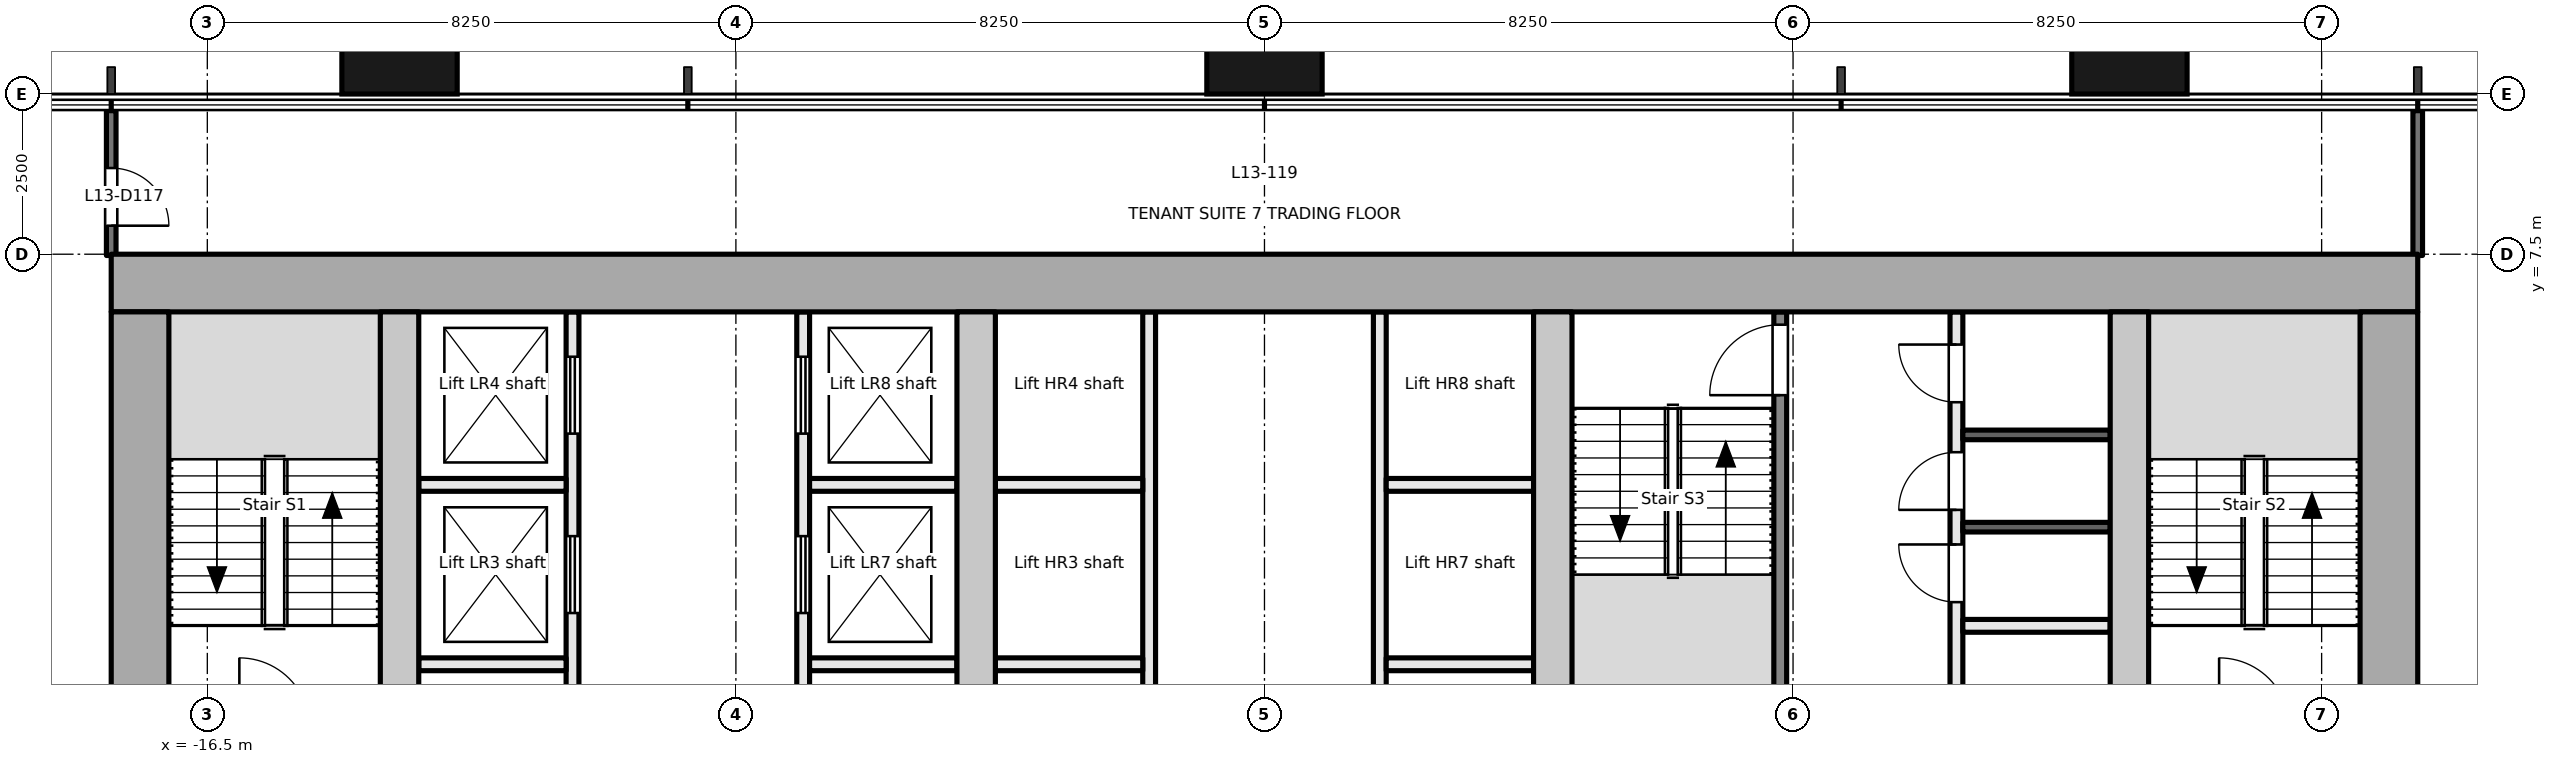
"""IFC4 building model, lengths in metres.
Left out: names, types, materials, properties, quantities, classifications, styles, units other than length and angle.
Written with IfcOpenShell. Run it as: python <this file> out.ifc"""

import sys

from ifc_helpers import new_model, si_unit, direction, frame, frame_2d, origin, origin_2d, place, context, subcontext, project, spatial, rectangle, extrude, element, fill, save


model = new_model("IFC4")
c1 = context("Model", 3, precision=1e-05, world=origin(), true_north=direction((0.0, 1.0)))
c2 = subcontext(c1, "Body", "Model", "MODEL_VIEW")
j1 = project(units=[si_unit("LENGTHUNIT", "METRE"), si_unit("PLANEANGLEUNIT", "RADIAN")], contexts=[c1])
p1 = place(None, origin())
s1 = spatial("IfcSite", under=j1, at=p1, CompositionType="ELEMENT")
p2 = place(p1, origin())
s2 = spatial("IfcBuilding", under=s1, at=p2, CompositionType="ELEMENT")
p3 = place(p2, frame((0.0, 0.0, 61.1)))
s3 = spatial("IfcBuildingStorey", under=s2, at=p3, CompositionType="ELEMENT", Elevation=61.1)
for number, where, z_axis, x_axis in (
    (1, (-13.5, 10.9, -0.2), (0.0, 0.0, 1.0), (1.0, 0.0, 0.0)),
    (2, (0.0, 10.9, -0.2), (0.0, 0.0, 1.0), (1.0, 0.0, 0.0)),
    (3, (13.5, 10.9, -0.2), (0.0, 0.0, 1.0), (1.0, 0.0, 0.0)),
):
    element("IfcColumn", number, at=place(p3, frame(where, z_axis=z_axis, x_axis=x_axis)), inside=s3, PredefinedType="COLUMN", context=c2, shape_type="SweptSolid", body=[
        extrude(rectangle(XDim=1.8, YDim=1.8, at=origin_2d()), origin(), (0.0, 0.0, 1.0), 4.1),
    ])
p4 = place(p3, frame((-18.0, 7.05, -0.2), z_axis=(0.0, 0.0, 1.0), x_axis=(1.0, 0.0, 0.0)))
e4 = element("IfcWall", 4, at=p4, inside=s3, PredefinedType="SHEAR", context=c2, shape_type="SweptSolid", body=[
    extrude(rectangle(XDim=36.0, YDim=0.9, at=frame_2d((18.0, 0.0))), origin(), (0.0, 0.0, 1.0), 4.1),
])
p5 = place(p3, frame((-17.55, -6.6, -0.2), z_axis=(0.0, 0.0, 1.0), x_axis=(0.0, 1.0, 0.0)))
e5 = element("IfcWall", 5, at=p5, inside=s3, PredefinedType="SHEAR", context=c2, shape_type="SweptSolid", body=[
    extrude(rectangle(XDim=13.2, YDim=0.9, at=frame_2d((6.6, 0.0))), origin(), (0.0, 0.0, 1.0), 4.1),
])
p6 = place(p5, frame((4.55, 0.0, 0.2)))
e6 = element("IfcOpeningElement", 6, at=p6, cuts=e5, PredefinedType="OPENING", context=c2, shape_type="SweptSolid", body=[
    extrude(rectangle(XDim=1.2, YDim=2.1, at=frame_2d((0.6, 1.05))), frame((0.0, 0.46, 0.0), z_axis=(0.0, -1.0, 0.0), x_axis=(1.0, 0.0, 0.0)), (0.0, 0.0, 1.0), 0.921),
])
p7 = place(p3, frame((17.55, -6.6, -0.2), z_axis=(0.0, 0.0, 1.0), x_axis=(0.0, 1.0, 0.0)))
e7 = element("IfcWall", 7, at=p7, inside=s3, PredefinedType="SHEAR", context=c2, shape_type="SweptSolid", body=[
    extrude(rectangle(XDim=13.2, YDim=0.9, at=frame_2d((6.6, 0.0))), origin(), (0.0, 0.0, 1.0), 4.1),
])
p8 = place(p7, frame((4.55, 0.0, 0.2)))
e8 = element("IfcOpeningElement", 8, at=p8, cuts=e7, PredefinedType="OPENING", context=c2, shape_type="SweptSolid", body=[
    extrude(rectangle(XDim=1.2, YDim=2.1, at=frame_2d((0.6, 1.05))), frame((0.0, 0.46, 0.0), z_axis=(0.0, -1.0, 0.0), x_axis=(1.0, 0.0, 0.0)), (0.0, 0.0, 1.0), 0.921),
])
for number, where, z_axis, x_axis in (
    (9, (-13.5, -6.6, -0.2), (0.0, 0.0, 1.0), (0.0, 1.0, 0.0)),
    (10, (-4.5, -6.6, -0.2), (0.0, 0.0, 1.0), (0.0, 1.0, 0.0)),
    (11, (4.5, -6.6, -0.2), (0.0, 0.0, 1.0), (0.0, 1.0, 0.0)),
    (12, (13.5, -6.6, -0.2), (0.0, 0.0, 1.0), (0.0, 1.0, 0.0)),
):
    element("IfcWall", number, at=place(p3, frame(where, z_axis=z_axis, x_axis=x_axis)), inside=s3, PredefinedType="SHEAR", context=c2, shape_type="SweptSolid", body=[
        extrude(rectangle(XDim=13.2, YDim=0.6, at=frame_2d((6.6, 0.0))), origin(), (0.0, 0.0, 1.0), 4.1),
    ])
p9 = place(p3, frame((-10.8, -6.6, 0.0), z_axis=(0.0, 0.0, 1.0), x_axis=(0.0, 1.0, 0.0)))
e13 = element("IfcWall", 13, at=p9, inside=s3, PredefinedType="PARTITIONING", context=c2, shape_type="SweptSolid", body=[
    extrude(rectangle(XDim=13.2, YDim=0.2, at=frame_2d((6.6, 0.0))), origin(), (0.0, 0.0, 1.0), 3.9),
])
p10 = place(p9, frame((0.55, 0.0, 0.0)))
e14 = element("IfcOpeningElement", 14, at=p10, cuts=e13, PredefinedType="OPENING", context=c2, shape_type="SweptSolid", body=[
    extrude(rectangle(XDim=0.9, YDim=2.1, at=frame_2d((0.45, 1.05))), frame((0.0, 0.111, 0.0), z_axis=(0.0, -1.0, 0.0), x_axis=(1.0, 0.0, 0.0)), (0.0, 0.0, 1.0), 0.221),
])
p11 = place(p9, frame((2.9, 0.0, 0.0)))
e15 = element("IfcOpeningElement", 15, at=p11, cuts=e13, PredefinedType="OPENING", context=c2, shape_type="SweptSolid", body=[
    extrude(rectangle(XDim=1.2, YDim=2.1, at=frame_2d((0.6, 1.05))), frame((0.0, 0.111, 0.0), z_axis=(0.0, -1.0, 0.0), x_axis=(1.0, 0.0, 0.0)), (0.0, 0.0, 1.0), 0.221),
])
p12 = place(p9, frame((5.7, 0.0, 0.0)))
e16 = element("IfcOpeningElement", 16, at=p12, cuts=e13, PredefinedType="OPENING", context=c2, shape_type="SweptSolid", body=[
    extrude(rectangle(XDim=1.2, YDim=2.1, at=frame_2d((0.6, 1.05))), frame((0.0, 0.111, 0.0), z_axis=(0.0, -1.0, 0.0), x_axis=(1.0, 0.0, 0.0)), (0.0, 0.0, 1.0), 0.221),
])
p13 = place(p9, frame((8.5, 0.0, 0.0)))
e17 = element("IfcOpeningElement", 17, at=p13, cuts=e13, PredefinedType="OPENING", context=c2, shape_type="SweptSolid", body=[
    extrude(rectangle(XDim=1.2, YDim=2.1, at=frame_2d((0.6, 1.05))), frame((0.0, 0.111, 0.0), z_axis=(0.0, -1.0, 0.0), x_axis=(1.0, 0.0, 0.0)), (0.0, 0.0, 1.0), 0.221),
])
p14 = place(p9, frame((11.3, 0.0, 0.0)))
e18 = element("IfcOpeningElement", 18, at=p14, cuts=e13, PredefinedType="OPENING", context=c2, shape_type="SweptSolid", body=[
    extrude(rectangle(XDim=1.2, YDim=2.1, at=frame_2d((0.6, 1.05))), frame((0.0, 0.111, 0.0), z_axis=(0.0, -1.0, 0.0), x_axis=(1.0, 0.0, 0.0)), (0.0, 0.0, 1.0), 0.221),
])
p15 = place(p3, frame((-7.2, -6.6, 0.0), z_axis=(0.0, 0.0, 1.0), x_axis=(0.0, 1.0, 0.0)))
e19 = element("IfcWall", 19, at=p15, inside=s3, PredefinedType="PARTITIONING", context=c2, shape_type="SweptSolid", body=[
    extrude(rectangle(XDim=13.2, YDim=0.2, at=frame_2d((6.6, 0.0))), origin(), (0.0, 0.0, 1.0), 3.9),
])
p16 = place(p15, frame((0.55, 0.0, 0.0)))
e20 = element("IfcOpeningElement", 20, at=p16, cuts=e19, PredefinedType="OPENING", context=c2, shape_type="SweptSolid", body=[
    extrude(rectangle(XDim=0.9, YDim=2.1, at=frame_2d((0.45, 1.05))), frame((0.0, 0.111, 0.0), z_axis=(0.0, -1.0, 0.0), x_axis=(1.0, 0.0, 0.0)), (0.0, 0.0, 1.0), 0.221),
])
p17 = place(p15, frame((2.9, 0.0, 0.0)))
e21 = element("IfcOpeningElement", 21, at=p17, cuts=e19, PredefinedType="OPENING", context=c2, shape_type="SweptSolid", body=[
    extrude(rectangle(XDim=1.2, YDim=2.1, at=frame_2d((0.6, 1.05))), frame((0.0, 0.111, 0.0), z_axis=(0.0, -1.0, 0.0), x_axis=(1.0, 0.0, 0.0)), (0.0, 0.0, 1.0), 0.221),
])
p18 = place(p15, frame((5.7, 0.0, 0.0)))
e22 = element("IfcOpeningElement", 22, at=p18, cuts=e19, PredefinedType="OPENING", context=c2, shape_type="SweptSolid", body=[
    extrude(rectangle(XDim=1.2, YDim=2.1, at=frame_2d((0.6, 1.05))), frame((0.0, 0.111, 0.0), z_axis=(0.0, -1.0, 0.0), x_axis=(1.0, 0.0, 0.0)), (0.0, 0.0, 1.0), 0.221),
])
p19 = place(p15, frame((8.5, 0.0, 0.0)))
e23 = element("IfcOpeningElement", 23, at=p19, cuts=e19, PredefinedType="OPENING", context=c2, shape_type="SweptSolid", body=[
    extrude(rectangle(XDim=1.2, YDim=2.1, at=frame_2d((0.6, 1.05))), frame((0.0, 0.111, 0.0), z_axis=(0.0, -1.0, 0.0), x_axis=(1.0, 0.0, 0.0)), (0.0, 0.0, 1.0), 0.221),
])
p20 = place(p15, frame((11.3, 0.0, 0.0)))
e24 = element("IfcOpeningElement", 24, at=p20, cuts=e19, PredefinedType="OPENING", context=c2, shape_type="SweptSolid", body=[
    extrude(rectangle(XDim=1.2, YDim=2.1, at=frame_2d((0.6, 1.05))), frame((0.0, 0.111, 0.0), z_axis=(0.0, -1.0, 0.0), x_axis=(1.0, 0.0, 0.0)), (0.0, 0.0, 1.0), 0.221),
])
for number, where, z_axis, x_axis in (
    (25, (-13.2, 1.1, 0.0), (0.0, 0.0, 1.0), (1.0, 0.0, 0.0)),
    (26, (-13.2, 3.9, 0.0), (0.0, 0.0, 1.0), (1.0, 0.0, 0.0)),
    (27, (-7.1, 1.1, 0.0), (0.0, 0.0, 1.0), (1.0, 0.0, 0.0)),
    (28, (-7.1, 3.9, 0.0), (0.0, 0.0, 1.0), (1.0, 0.0, 0.0)),
):
    element("IfcWall", number, at=place(p3, frame(where, z_axis=z_axis, x_axis=x_axis)), inside=s3, PredefinedType="PARTITIONING", context=c2, shape_type="SweptSolid", body=[
        extrude(rectangle(XDim=2.3, YDim=0.2, at=frame_2d((1.15, 0.0))), origin(), (0.0, 0.0, 1.0), 3.9),
    ])
p21 = place(p3, frame((-1.8, -6.6, 0.0), z_axis=(0.0, 0.0, 1.0), x_axis=(0.0, 1.0, 0.0)))
e29 = element("IfcWall", 29, at=p21, inside=s3, PredefinedType="PARTITIONING", context=c2, shape_type="SweptSolid", body=[
    extrude(rectangle(XDim=13.2, YDim=0.2, at=frame_2d((6.6, 0.0))), origin(), (0.0, 0.0, 1.0), 3.9),
])
p22 = place(p21, frame((0.55, 0.0, 0.0)))
e30 = element("IfcOpeningElement", 30, at=p22, cuts=e29, PredefinedType="OPENING", context=c2, shape_type="SweptSolid", body=[
    extrude(rectangle(XDim=0.9, YDim=2.1, at=frame_2d((0.45, 1.05))), frame((0.0, 0.111, 0.0), z_axis=(0.0, -1.0, 0.0), x_axis=(1.0, 0.0, 0.0)), (0.0, 0.0, 1.0), 0.221),
])
p23 = place(p3, frame((1.8, -6.6, 0.0), z_axis=(0.0, 0.0, 1.0), x_axis=(0.0, 1.0, 0.0)))
e31 = element("IfcWall", 31, at=p23, inside=s3, PredefinedType="PARTITIONING", context=c2, shape_type="SweptSolid", body=[
    extrude(rectangle(XDim=13.2, YDim=0.2, at=frame_2d((6.6, 0.0))), origin(), (0.0, 0.0, 1.0), 3.9),
])
p24 = place(p23, frame((0.55, 0.0, 0.0)))
e32 = element("IfcOpeningElement", 32, at=p24, cuts=e31, PredefinedType="OPENING", context=c2, shape_type="SweptSolid", body=[
    extrude(rectangle(XDim=0.9, YDim=2.1, at=frame_2d((0.45, 1.05))), frame((0.0, 0.111, 0.0), z_axis=(0.0, -1.0, 0.0), x_axis=(1.0, 0.0, 0.0)), (0.0, 0.0, 1.0), 0.221),
])
for number, where, z_axis, x_axis in (
    (33, (-4.2, 1.1, 0.0), (0.0, 0.0, 1.0), (1.0, 0.0, 0.0)),
    (34, (-4.2, 3.9, 0.0), (0.0, 0.0, 1.0), (1.0, 0.0, 0.0)),
    (35, (1.9, 1.1, 0.0), (0.0, 0.0, 1.0), (1.0, 0.0, 0.0)),
    (36, (1.9, 3.9, 0.0), (0.0, 0.0, 1.0), (1.0, 0.0, 0.0)),
):
    element("IfcWall", number, at=place(p3, frame(where, z_axis=z_axis, x_axis=x_axis)), inside=s3, PredefinedType="PARTITIONING", context=c2, shape_type="SweptSolid", body=[
        extrude(rectangle(XDim=2.3, YDim=0.2, at=frame_2d((1.15, 0.0))), origin(), (0.0, 0.0, 1.0), 3.9),
    ])
p25 = place(p3, frame((8.05, -6.6, 0.0), z_axis=(0.0, 0.0, 1.0), x_axis=(0.0, 1.0, 0.0)))
e37 = element("IfcWall", 37, at=p25, inside=s3, PredefinedType="PARTITIONING", context=c2, shape_type="SweptSolid", body=[
    extrude(rectangle(XDim=13.2, YDim=0.2, at=frame_2d((6.6, 0.0))), origin(), (0.0, 0.0, 1.0), 3.9),
])
p26 = place(p25, frame((0.298, 0.0, 0.0)))
e38 = element("IfcOpeningElement", 38, at=p26, cuts=e37, PredefinedType="OPENING", context=c2, shape_type="SweptSolid", body=[
    extrude(rectangle(XDim=0.9, YDim=2.1, at=frame_2d((0.45, 1.05))), frame((0.0, 0.111, 0.0), z_axis=(0.0, -1.0, 0.0), x_axis=(1.0, 0.0, 0.0)), (0.0, 0.0, 1.0), 0.221),
])
p27 = place(p25, frame((2.066, 0.0, 0.0)))
e39 = element("IfcOpeningElement", 39, at=p27, cuts=e37, PredefinedType="OPENING", context=c2, shape_type="SweptSolid", body=[
    extrude(rectangle(XDim=0.9, YDim=2.1, at=frame_2d((0.45, 1.05))), frame((0.0, 0.111, 0.0), z_axis=(0.0, -1.0, 0.0), x_axis=(1.0, 0.0, 0.0)), (0.0, 0.0, 1.0), 0.221),
])
p28 = place(p25, frame((3.834, 0.0, 0.0)))
e40 = element("IfcOpeningElement", 40, at=p28, cuts=e37, PredefinedType="OPENING", context=c2, shape_type="SweptSolid", body=[
    extrude(rectangle(XDim=0.9, YDim=2.1, at=frame_2d((0.45, 1.05))), frame((0.0, 0.111, 0.0), z_axis=(0.0, -1.0, 0.0), x_axis=(1.0, 0.0, 0.0)), (0.0, 0.0, 1.0), 0.221),
])
p29 = place(p25, frame((5.466, 0.0, 0.0)))
e41 = element("IfcOpeningElement", 41, at=p29, cuts=e37, PredefinedType="OPENING", context=c2, shape_type="SweptSolid", body=[
    extrude(rectangle(XDim=0.9, YDim=2.1, at=frame_2d((0.45, 1.05))), frame((0.0, 0.111, 0.0), z_axis=(0.0, -1.0, 0.0), x_axis=(1.0, 0.0, 0.0)), (0.0, 0.0, 1.0), 0.221),
])
p30 = place(p25, frame((11.9, 0.0, 0.0)))
e42 = element("IfcOpeningElement", 42, at=p30, cuts=e37, PredefinedType="OPENING", context=c2, shape_type="SweptSolid", body=[
    extrude(rectangle(XDim=1.1, YDim=2.1, at=frame_2d((0.55, 1.05))), frame((0.0, 0.111, 0.0), z_axis=(0.0, -1.0, 0.0), x_axis=(1.0, 0.0, 0.0)), (0.0, 0.0, 1.0), 0.221),
])
p31 = place(p3, frame((10.8, -6.6, 0.0), z_axis=(0.0, 0.0, 1.0), x_axis=(0.0, 1.0, 0.0)))
e43 = element("IfcWall", 43, at=p31, inside=s3, PredefinedType="PARTITIONING", context=c2, shape_type="SweptSolid", body=[
    extrude(rectangle(XDim=13.2, YDim=0.2, at=frame_2d((6.6, 0.0))), origin(), (0.0, 0.0, 1.0), 3.9),
])
p32 = place(p31, frame((0.7, 0.0, 0.0)))
e44 = element("IfcOpeningElement", 44, at=p32, cuts=e43, PredefinedType="OPENING", context=c2, shape_type="SweptSolid", body=[
    extrude(rectangle(XDim=1.2, YDim=2.1, at=frame_2d((0.6, 1.05))), frame((0.0, 0.111, 0.0), z_axis=(0.0, -1.0, 0.0), x_axis=(1.0, 0.0, 0.0)), (0.0, 0.0, 1.0), 0.221),
])
p33 = place(p31, frame((8.67, 0.0, 0.0)))
e45 = element("IfcOpeningElement", 45, at=p33, cuts=e43, PredefinedType="OPENING", context=c2, shape_type="SweptSolid", body=[
    extrude(rectangle(XDim=0.9, YDim=2.1, at=frame_2d((0.45, 1.05))), frame((0.0, 0.111, 0.0), z_axis=(0.0, -1.0, 0.0), x_axis=(1.0, 0.0, 0.0)), (0.0, 0.0, 1.0), 0.221),
])
p34 = place(p31, frame((10.11, 0.0, 0.0)))
e46 = element("IfcOpeningElement", 46, at=p34, cuts=e43, PredefinedType="OPENING", context=c2, shape_type="SweptSolid", body=[
    extrude(rectangle(XDim=0.9, YDim=2.1, at=frame_2d((0.45, 1.05))), frame((0.0, 0.111, 0.0), z_axis=(0.0, -1.0, 0.0), x_axis=(1.0, 0.0, 0.0)), (0.0, 0.0, 1.0), 0.221),
])
p35 = place(p31, frame((11.79, 0.0, 0.0)))
e47 = element("IfcOpeningElement", 47, at=p35, cuts=e43, PredefinedType="OPENING", context=c2, shape_type="SweptSolid", body=[
    extrude(rectangle(XDim=0.9, YDim=2.1, at=frame_2d((0.45, 1.05))), frame((0.0, 0.111, 0.0), z_axis=(0.0, -1.0, 0.0), x_axis=(1.0, 0.0, 0.0)), (0.0, 0.0, 1.0), 0.221),
])
p36 = place(p3, frame((10.9, 1.7, 0.0), z_axis=(0.0, 0.0, 1.0), x_axis=(1.0, 0.0, 0.0)))
e48 = element("IfcWall", 48, at=p36, inside=s3, PredefinedType="PARTITIONING", context=c2, shape_type="SweptSolid", body=[
    extrude(rectangle(XDim=2.3, YDim=0.2, at=frame_2d((1.15, 0.0))), origin(), (0.0, 0.0, 1.0), 3.9),
])
for number, where, z_axis, x_axis in (
    (49, (10.9, 3.24, 0.0), (0.0, 0.0, 1.0), (1.0, 0.0, 0.0)),
    (50, (10.9, 4.68, 0.0), (0.0, 0.0, 1.0), (1.0, 0.0, 0.0)),
):
    element("IfcWall", number, at=place(p3, frame(where, z_axis=z_axis, x_axis=x_axis)), inside=s3, PredefinedType="PARTITIONING", context=c2, shape_type="SweptSolid", body=[
        extrude(rectangle(XDim=2.3, YDim=0.15, at=frame_2d((1.15, 0.0))), origin(), (0.0, 0.0, 1.0), 3.9),
    ])
p37 = place(p3, frame((-18.0, 9.74, 0.0), z_axis=(0.0, 0.0, 1.0), x_axis=(0.0, -1.0, 0.0)))
e51 = element("IfcWall", 51, at=p37, inside=s3, PredefinedType="PARTITIONING", context=c2, shape_type="SweptSolid", body=[
    extrude(rectangle(XDim=2.26, YDim=0.15, at=frame_2d((1.13, 0.0))), origin(), (0.0, 0.0, 1.0), 2.9),
])
p38 = place(p37, frame((0.895, 0.0, 0.0)))
e52 = element("IfcOpeningElement", 52, at=p38, cuts=e51, PredefinedType="OPENING", context=c2, shape_type="SweptSolid", body=[
    extrude(rectangle(XDim=0.9, YDim=2.1, at=frame_2d((0.45, 1.05))), frame((0.0, 0.085, 0.0), z_axis=(0.0, -1.0, 0.0), x_axis=(1.0, 0.0, 0.0)), (0.0, 0.0, 1.0), 0.171),
])
p39 = place(p3, frame((18.0, 7.48, 0.0), z_axis=(0.0, 0.0, 1.0), x_axis=(0.0, 1.0, 0.0)))
e53 = element("IfcWall", 53, at=p39, inside=s3, PredefinedType="PARTITIONING", context=c2, shape_type="SweptSolid", body=[
    extrude(rectangle(XDim=2.26, YDim=0.15, at=frame_2d((1.13, 0.0))), origin(), (0.0, 0.0, 1.0), 2.9),
])
p40 = place(p13, origin())
e54 = element("IfcDoor", 54, at=p40, inside=s3, OperationType="DOUBLE_DOOR_SLIDING", PredefinedType="DOOR", context=c2, shape_type="SweptSolid", body=[
    extrude(rectangle(XDim=1.2, YDim=2.1, at=frame_2d((0.6, 1.05))), frame((0.0, 0.025, 0.0), z_axis=(0.0, -1.0, 0.0), x_axis=(1.0, 0.0, 0.0)), (0.0, 0.0, 1.0), 0.05),
])
fill(e17, e54)
p41 = place(p14, origin())
e55 = element("IfcDoor", 55, at=p41, inside=s3, OperationType="DOUBLE_DOOR_SLIDING", PredefinedType="DOOR", context=c2, shape_type="SweptSolid", body=[
    extrude(rectangle(XDim=1.2, YDim=2.1, at=frame_2d((0.6, 1.05))), frame((0.0, 0.025, 0.0), z_axis=(0.0, -1.0, 0.0), x_axis=(1.0, 0.0, 0.0)), (0.0, 0.0, 1.0), 0.05),
])
fill(e18, e55)
p42 = place(p19, origin())
e56 = element("IfcDoor", 56, at=p42, inside=s3, OperationType="DOUBLE_DOOR_SLIDING", PredefinedType="DOOR", context=c2, shape_type="SweptSolid", body=[
    extrude(rectangle(XDim=1.2, YDim=2.1, at=frame_2d((0.6, 1.05))), frame((0.0, 0.025, 0.0), z_axis=(0.0, -1.0, 0.0), x_axis=(1.0, 0.0, 0.0)), (0.0, 0.0, 1.0), 0.05),
])
fill(e23, e56)
p43 = place(p20, origin())
e57 = element("IfcDoor", 57, at=p43, inside=s3, OperationType="DOUBLE_DOOR_SLIDING", PredefinedType="DOOR", context=c2, shape_type="SweptSolid", body=[
    extrude(rectangle(XDim=1.2, YDim=2.1, at=frame_2d((0.6, 1.05))), frame((0.0, 0.025, 0.0), z_axis=(0.0, -1.0, 0.0), x_axis=(1.0, 0.0, 0.0)), (0.0, 0.0, 1.0), 0.05),
])
fill(e24, e57)
p44 = place(p30, origin())
e58 = element("IfcDoor", 58, at=p44, inside=s3, OperationType="SINGLE_SWING_LEFT", PredefinedType="DOOR", context=c2, shape_type="SweptSolid", body=[
    extrude(rectangle(XDim=1.1, YDim=2.1, at=frame_2d((0.55, 1.05))), frame((0.0, 0.025, 0.0), z_axis=(0.0, -1.0, 0.0), x_axis=(1.0, 0.0, 0.0)), (0.0, 0.0, 1.0), 0.05),
])
fill(e42, e58)
p45 = place(p33, origin())
e59 = element("IfcDoor", 59, at=p45, inside=s3, OperationType="SINGLE_SWING_RIGHT", PredefinedType="DOOR", context=c2, shape_type="SweptSolid", body=[
    extrude(rectangle(XDim=0.9, YDim=2.1, at=frame_2d((0.45, 1.05))), frame((0.0, 0.025, 0.0), z_axis=(0.0, -1.0, 0.0), x_axis=(1.0, 0.0, 0.0)), (0.0, 0.0, 1.0), 0.05),
])
fill(e45, e59)
p46 = place(p34, origin())
e60 = element("IfcDoor", 60, at=p46, inside=s3, OperationType="SINGLE_SWING_LEFT", PredefinedType="DOOR", context=c2, shape_type="SweptSolid", body=[
    extrude(rectangle(XDim=0.9, YDim=2.1, at=frame_2d((0.45, 1.05))), frame((0.0, 0.025, 0.0), z_axis=(0.0, -1.0, 0.0), x_axis=(1.0, 0.0, 0.0)), (0.0, 0.0, 1.0), 0.05),
])
fill(e46, e60)
p47 = place(p35, origin())
e61 = element("IfcDoor", 61, at=p47, inside=s3, OperationType="SINGLE_SWING_RIGHT", PredefinedType="DOOR", context=c2, shape_type="SweptSolid", body=[
    extrude(rectangle(XDim=0.9, YDim=2.1, at=frame_2d((0.45, 1.05))), frame((0.0, 0.025, 0.0), z_axis=(0.0, -1.0, 0.0), x_axis=(1.0, 0.0, 0.0)), (0.0, 0.0, 1.0), 0.05),
])
fill(e47, e61)
p48 = place(p38, origin())
e62 = element("IfcDoor", 62, at=p48, inside=s3, OperationType="SINGLE_SWING_RIGHT", PredefinedType="DOOR", context=c2, shape_type="SweptSolid", body=[
    extrude(rectangle(XDim=0.9, YDim=2.1, at=frame_2d((0.45, 1.05))), frame((0.0, 0.025, 0.0), z_axis=(0.0, -1.0, 0.0), x_axis=(1.0, 0.0, 0.0)), (0.0, 0.0, 1.0), 0.05),
])
fill(e52, e62)
save(model, sys.argv[1])
